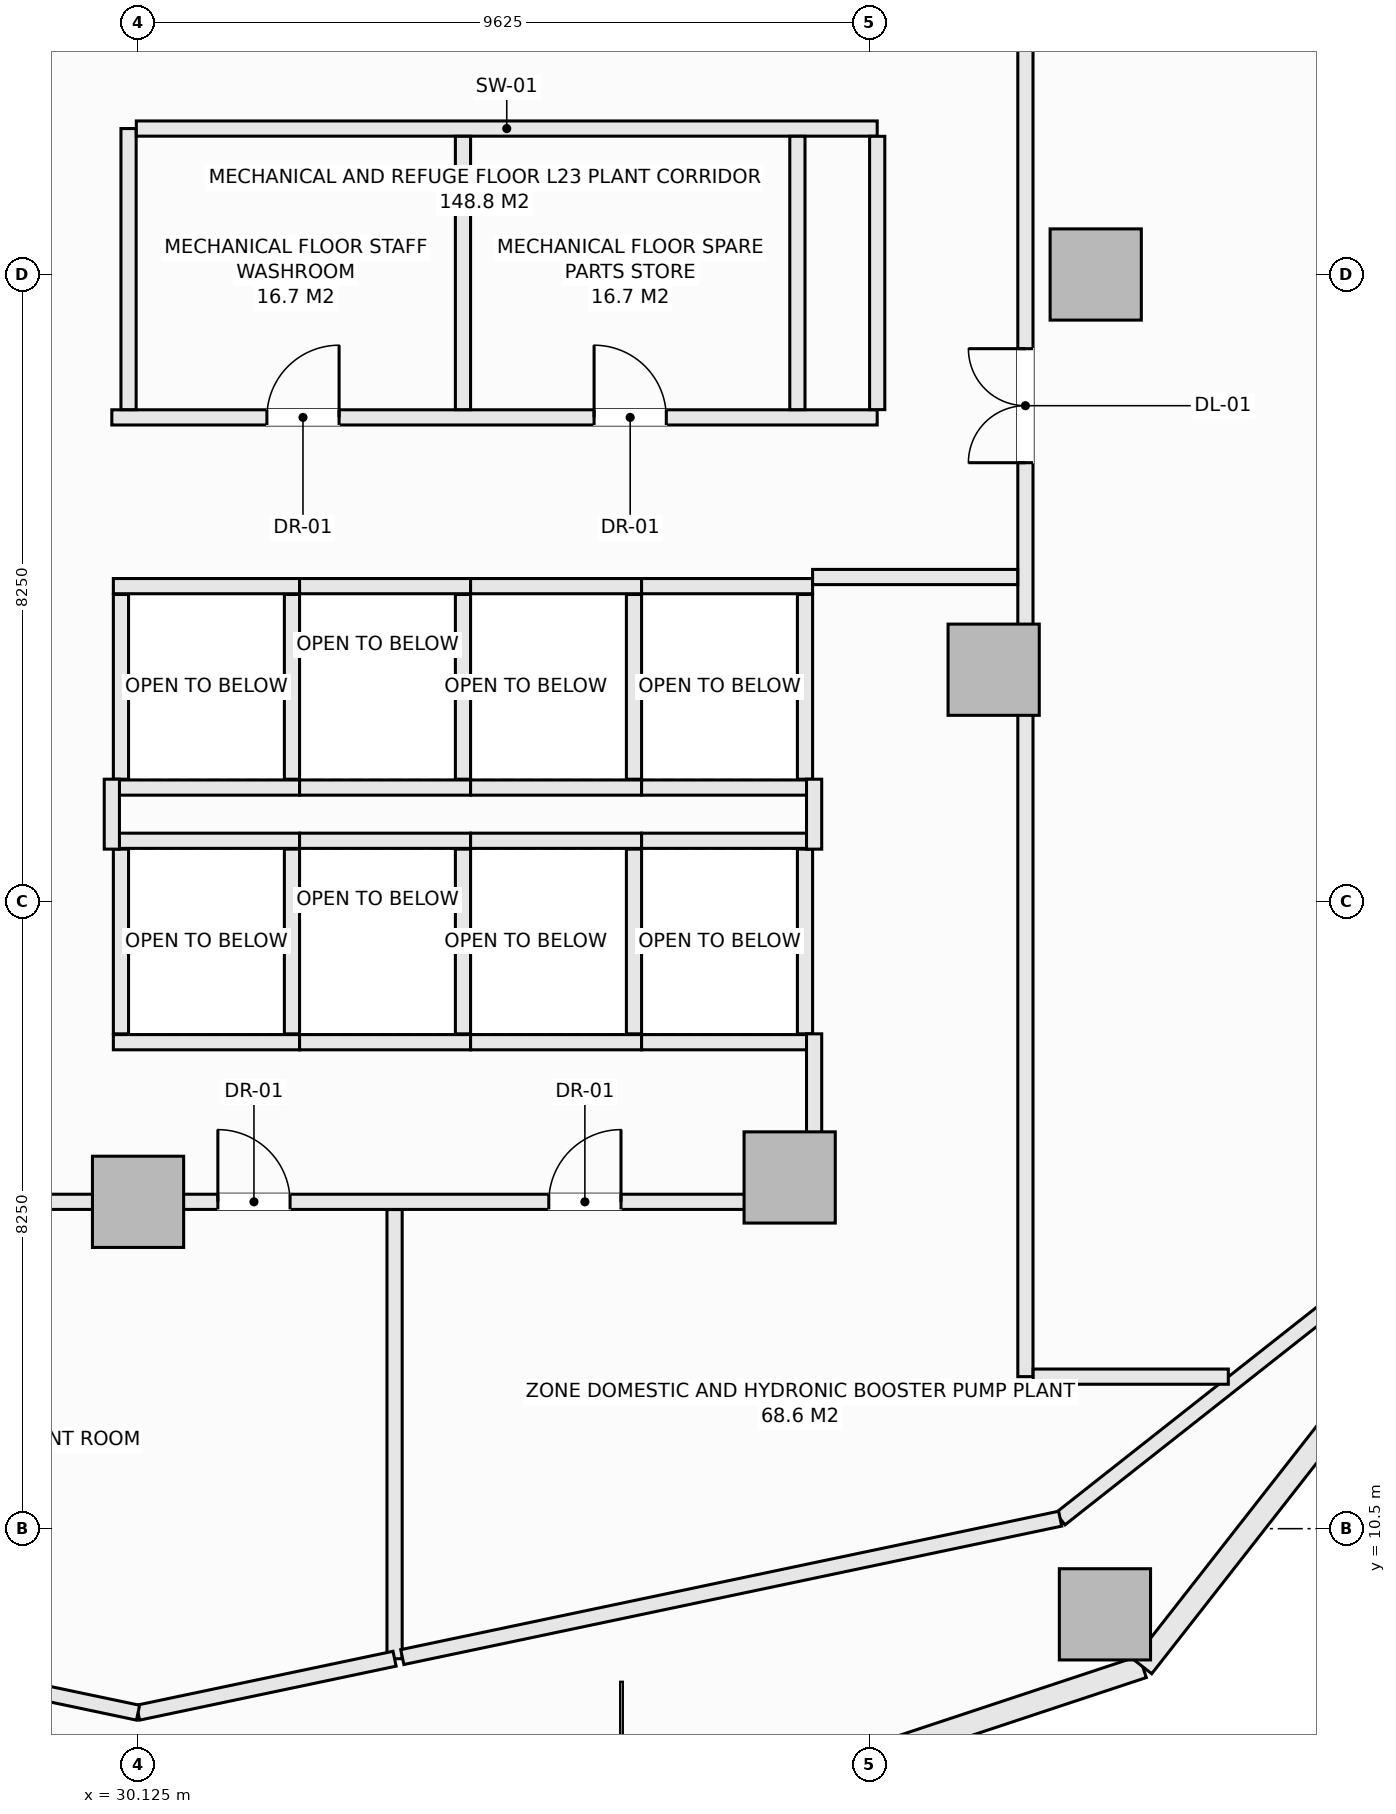
"""IFC4 building model, lengths in metres.
Left out: names, types, materials, properties, quantities, classifications, styles, units other than length and angle.
Written with IfcOpenShell. Run it as: python <this file> out.ifc"""

import sys

from ifc_helpers import new_model, si_unit, direction, frame, frame_2d, origin, origin_2d, place, context, subcontext, project, spatial, rectangle, extrude, element, fill, save


model = new_model("IFC4")
c1 = context("Model", 3, precision=1e-05, world=origin(), true_north=direction((0.0, 1.0)))
c2 = subcontext(c1, "Body", "Model", "MODEL_VIEW")
j1 = project(units=[si_unit("LENGTHUNIT", "METRE"), si_unit("PLANEANGLEUNIT", "RADIAN")], contexts=[c1])
p1 = place(None, origin())
s1 = spatial("IfcSite", under=j1, at=p1, CompositionType="ELEMENT")
p2 = place(p1, origin())
s2 = spatial("IfcBuilding", under=s1, at=p2, CompositionType="ELEMENT")
p3 = place(p2, frame((0.0, 0.0, 95.8)))
s3 = spatial("IfcBuildingStorey", under=s2, at=p3, CompositionType="ELEMENT", Elevation=95.8)
for number, where, z_axis, x_axis in (
    (1, (42.846, 9.373, -0.32), (0.0, 0.0, 1.0), (1.0, 0.0, 0.0)),
    (2, (42.725, 27.0, -0.32), (0.0, 0.0, 1.0), (1.0, 0.0, 0.0)),
    (3, (30.125, 14.8, -0.32), (0.0, 0.0, 1.0), (1.0, 0.0, 0.0)),
    (4, (38.698, 15.121, -0.32), (0.0, 0.0, 1.0), (1.0, 0.0, 0.0)),
    (5, (41.382, 21.801, -0.32), (0.0, 0.0, 1.0), (1.0, 0.0, 0.0)),
):
    element("IfcColumn", number, at=place(p3, frame(where, z_axis=z_axis, x_axis=x_axis)), inside=s3, PredefinedType="COLUMN", context=c2, shape_type="SweptSolid", body=[
        extrude(rectangle(XDim=1.2, YDim=1.2, at=origin_2d()), origin(), (0.0, 0.0, 1.0), 5.04),
    ])
p4 = place(p3, frame((36.968, 6.571, 0.0), z_axis=(0.0, 0.0, 1.0), x_axis=(0.949245153629, 0.314537181127, 0.0)))
e6 = element("IfcWall", 6, at=p4, inside=s3, PredefinedType="SOLIDWALL", context=c2, shape_type="SweptSolid", body=[
    extrude(rectangle(XDim=6.717, YDim=0.3, at=frame_2d((3.358, 0.0))), origin(), (0.0, 0.0, 1.0), 1.15),
])
p5 = place(p3, frame((43.344, 8.684, 0.0), z_axis=(0.0, 0.0, 1.0), x_axis=(0.616434798832, 0.78740595552, 0.0)))
e7 = element("IfcWall", 7, at=p5, inside=s3, PredefinedType="SOLIDWALL", context=c2, shape_type="SweptSolid", body=[
    extrude(rectangle(XDim=6.294, YDim=0.3, at=frame_2d((3.147, 0.0))), origin(), (0.0, 0.0, 1.0), 1.15),
])
for number, where, z_axis, x_axis in (
    (8, (29.8, 19.55, 0.0), (0.0, 0.0, 1.0), (1.0, 0.0, 0.0)),
    (9, (29.8, 16.9, 0.0), (0.0, 0.0, 1.0), (1.0, 0.0, 0.0)),
):
    element("IfcWall", number, at=place(p3, frame(where, z_axis=z_axis, x_axis=x_axis)), inside=s3, PredefinedType="SOLIDWALL", context=c2, shape_type="SweptSolid", body=[
        extrude(rectangle(XDim=2.45, YDim=0.2, at=frame_2d((1.225, 0.0))), origin(), (0.0, 0.0, 1.0), 4.72),
    ])
for number, where, z_axis, x_axis in (
    (10, (29.9, 17.01, 0.0), (0.0, 0.0, 1.0), (0.0, 1.0, 0.0)),
    (11, (32.15, 17.01, 0.0), (0.0, 0.0, 1.0), (0.0, 1.0, 0.0)),
):
    element("IfcWall", number, at=place(p3, frame(where, z_axis=z_axis, x_axis=x_axis)), inside=s3, PredefinedType="SOLIDWALL", context=c2, shape_type="SweptSolid", body=[
        extrude(rectangle(XDim=2.43, YDim=0.2, at=frame_2d((1.215, 0.0))), origin(), (0.0, 0.0, 1.0), 4.72),
    ])
for number, where, z_axis, x_axis in (
    (12, (32.25, 19.55, 0.0), (0.0, 0.0, 1.0), (1.0, 0.0, 0.0)),
    (13, (32.25, 16.9, 0.0), (0.0, 0.0, 1.0), (1.0, 0.0, 0.0)),
):
    element("IfcWall", number, at=place(p3, frame(where, z_axis=z_axis, x_axis=x_axis)), inside=s3, PredefinedType="SOLIDWALL", context=c2, shape_type="SweptSolid", body=[
        extrude(rectangle(XDim=2.25, YDim=0.2, at=frame_2d((1.125, 0.0))), origin(), (0.0, 0.0, 1.0), 4.72),
    ])
p6 = place(p3, frame((34.4, 17.01, 0.0), z_axis=(0.0, 0.0, 1.0), x_axis=(0.0, 1.0, 0.0)))
e14 = element("IfcWall", 14, at=p6, inside=s3, PredefinedType="SOLIDWALL", context=c2, shape_type="SweptSolid", body=[
    extrude(rectangle(XDim=2.43, YDim=0.2, at=frame_2d((1.215, 0.0))), origin(), (0.0, 0.0, 1.0), 4.72),
])
for number, where, z_axis, x_axis in (
    (15, (34.5, 19.55, 0.0), (0.0, 0.0, 1.0), (1.0, 0.0, 0.0)),
    (16, (34.5, 16.9, 0.0), (0.0, 0.0, 1.0), (1.0, 0.0, 0.0)),
):
    element("IfcWall", number, at=place(p3, frame(where, z_axis=z_axis, x_axis=x_axis)), inside=s3, PredefinedType="SOLIDWALL", context=c2, shape_type="SweptSolid", body=[
        extrude(rectangle(XDim=2.25, YDim=0.2, at=frame_2d((1.125, 0.0))), origin(), (0.0, 0.0, 1.0), 4.72),
    ])
p7 = place(p3, frame((36.65, 17.01, 0.0), z_axis=(0.0, 0.0, 1.0), x_axis=(0.0, 1.0, 0.0)))
e17 = element("IfcWall", 17, at=p7, inside=s3, PredefinedType="SOLIDWALL", context=c2, shape_type="SweptSolid", body=[
    extrude(rectangle(XDim=2.43, YDim=0.2, at=frame_2d((1.215, 0.0))), origin(), (0.0, 0.0, 1.0), 4.72),
])
for number, where, z_axis, x_axis in (
    (18, (36.75, 19.55, 0.0), (0.0, 0.0, 1.0), (1.0, 0.0, 0.0)),
    (19, (36.75, 16.9, 0.0), (0.0, 0.0, 1.0), (1.0, 0.0, 0.0)),
):
    element("IfcWall", number, at=place(p3, frame(where, z_axis=z_axis, x_axis=x_axis)), inside=s3, PredefinedType="SOLIDWALL", context=c2, shape_type="SweptSolid", body=[
        extrude(rectangle(XDim=2.25, YDim=0.2, at=frame_2d((1.125, 0.0))), origin(), (0.0, 0.0, 1.0), 4.72),
    ])
p8 = place(p3, frame((38.9, 17.01, 0.0), z_axis=(0.0, 0.0, 1.0), x_axis=(0.0, 1.0, 0.0)))
e20 = element("IfcWall", 20, at=p8, inside=s3, PredefinedType="SOLIDWALL", context=c2, shape_type="SweptSolid", body=[
    extrude(rectangle(XDim=2.43, YDim=0.2, at=frame_2d((1.215, 0.0))), origin(), (0.0, 0.0, 1.0), 4.72),
])
for number, where, z_axis, x_axis in (
    (21, (29.8, 22.9, 0.0), (0.0, 0.0, 1.0), (1.0, 0.0, 0.0)),
    (22, (29.8, 20.25, 0.0), (0.0, 0.0, 1.0), (1.0, 0.0, 0.0)),
):
    element("IfcWall", number, at=place(p3, frame(where, z_axis=z_axis, x_axis=x_axis)), inside=s3, PredefinedType="SOLIDWALL", context=c2, shape_type="SweptSolid", body=[
        extrude(rectangle(XDim=2.45, YDim=0.2, at=frame_2d((1.225, 0.0))), origin(), (0.0, 0.0, 1.0), 4.72),
    ])
for number, where, z_axis, x_axis in (
    (23, (29.9, 20.36, 0.0), (0.0, 0.0, 1.0), (0.0, 1.0, 0.0)),
    (24, (32.15, 20.36, 0.0), (0.0, 0.0, 1.0), (0.0, 1.0, 0.0)),
):
    element("IfcWall", number, at=place(p3, frame(where, z_axis=z_axis, x_axis=x_axis)), inside=s3, PredefinedType="SOLIDWALL", context=c2, shape_type="SweptSolid", body=[
        extrude(rectangle(XDim=2.43, YDim=0.2, at=frame_2d((1.215, 0.0))), origin(), (0.0, 0.0, 1.0), 4.72),
    ])
for number, where, z_axis, x_axis in (
    (25, (32.25, 22.9, 0.0), (0.0, 0.0, 1.0), (1.0, 0.0, 0.0)),
    (26, (32.25, 20.25, 0.0), (0.0, 0.0, 1.0), (1.0, 0.0, 0.0)),
):
    element("IfcWall", number, at=place(p3, frame(where, z_axis=z_axis, x_axis=x_axis)), inside=s3, PredefinedType="SOLIDWALL", context=c2, shape_type="SweptSolid", body=[
        extrude(rectangle(XDim=2.25, YDim=0.2, at=frame_2d((1.125, 0.0))), origin(), (0.0, 0.0, 1.0), 4.72),
    ])
p9 = place(p3, frame((34.4, 20.36, 0.0), z_axis=(0.0, 0.0, 1.0), x_axis=(0.0, 1.0, 0.0)))
e27 = element("IfcWall", 27, at=p9, inside=s3, PredefinedType="SOLIDWALL", context=c2, shape_type="SweptSolid", body=[
    extrude(rectangle(XDim=2.43, YDim=0.2, at=frame_2d((1.215, 0.0))), origin(), (0.0, 0.0, 1.0), 4.72),
])
for number, where, z_axis, x_axis in (
    (28, (34.5, 22.9, 0.0), (0.0, 0.0, 1.0), (1.0, 0.0, 0.0)),
    (29, (34.5, 20.25, 0.0), (0.0, 0.0, 1.0), (1.0, 0.0, 0.0)),
):
    element("IfcWall", number, at=place(p3, frame(where, z_axis=z_axis, x_axis=x_axis)), inside=s3, PredefinedType="SOLIDWALL", context=c2, shape_type="SweptSolid", body=[
        extrude(rectangle(XDim=2.25, YDim=0.2, at=frame_2d((1.125, 0.0))), origin(), (0.0, 0.0, 1.0), 4.72),
    ])
p10 = place(p3, frame((36.65, 20.36, 0.0), z_axis=(0.0, 0.0, 1.0), x_axis=(0.0, 1.0, 0.0)))
e30 = element("IfcWall", 30, at=p10, inside=s3, PredefinedType="SOLIDWALL", context=c2, shape_type="SweptSolid", body=[
    extrude(rectangle(XDim=2.43, YDim=0.2, at=frame_2d((1.215, 0.0))), origin(), (0.0, 0.0, 1.0), 4.72),
])
for number, where, z_axis, x_axis in (
    (31, (36.75, 22.9, 0.0), (0.0, 0.0, 1.0), (1.0, 0.0, 0.0)),
    (32, (36.75, 20.25, 0.0), (0.0, 0.0, 1.0), (1.0, 0.0, 0.0)),
):
    element("IfcWall", number, at=place(p3, frame(where, z_axis=z_axis, x_axis=x_axis)), inside=s3, PredefinedType="SOLIDWALL", context=c2, shape_type="SweptSolid", body=[
        extrude(rectangle(XDim=2.25, YDim=0.2, at=frame_2d((1.125, 0.0))), origin(), (0.0, 0.0, 1.0), 4.72),
    ])
p11 = place(p3, frame((38.9, 20.36, 0.0), z_axis=(0.0, 0.0, 1.0), x_axis=(0.0, 1.0, 0.0)))
e33 = element("IfcWall", 33, at=p11, inside=s3, PredefinedType="SOLIDWALL", context=c2, shape_type="SweptSolid", body=[
    extrude(rectangle(XDim=2.43, YDim=0.2, at=frame_2d((1.215, 0.0))), origin(), (0.0, 0.0, 1.0), 4.72),
])
p12 = place(p3, frame((29.78, 25.12, 0.0), z_axis=(0.0, 0.0, 1.0), x_axis=(1.0, 0.0, 0.0)))
e34 = element("IfcWall", 34, at=p12, inside=s3, PredefinedType="SOLIDWALL", context=c2, shape_type="SweptSolid", body=[
    extrude(rectangle(XDim=10.07, YDim=0.2, at=frame_2d((5.035, 0.0))), origin(), (0.0, 0.0, 1.0), 4.72),
])
p13 = place(p12, frame((2.04, 0.0, 0.0)))
e35 = element("IfcOpeningElement", 35, at=p13, cuts=e34, PredefinedType="OPENING", context=c2, shape_type="SweptSolid", body=[
    extrude(rectangle(XDim=0.95, YDim=2.1, at=frame_2d((0.475, 1.05))), frame((0.0, 0.11, 0.0), z_axis=(0.0, -1.0, 0.0), x_axis=(1.0, 0.0, 0.0)), (0.0, 0.0, 1.0), 0.22),
])
p14 = place(p12, frame((6.345, 0.0, 0.0)))
e36 = element("IfcOpeningElement", 36, at=p14, cuts=e34, PredefinedType="OPENING", context=c2, shape_type="SweptSolid", body=[
    extrude(rectangle(XDim=0.95, YDim=2.1, at=frame_2d((0.475, 1.05))), frame((0.0, 0.11, 0.0), z_axis=(0.0, -1.0, 0.0), x_axis=(1.0, 0.0, 0.0)), (0.0, 0.0, 1.0), 0.22),
])
p15 = place(p3, frame((30.0, 25.222, 0.0), z_axis=(0.0, 0.0, 1.0), x_axis=(0.0, 1.0, 0.0)))
e37 = element("IfcWall", 37, at=p15, inside=s3, PredefinedType="SOLIDWALL", context=c2, shape_type="SweptSolid", body=[
    extrude(rectangle(XDim=3.698, YDim=0.2, at=frame_2d((1.849, 0.0))), origin(), (0.0, 0.0, 1.0), 4.72),
])
p16 = place(p3, frame((30.102, 28.92, 0.0), z_axis=(0.0, 0.0, 1.0), x_axis=(1.0, 0.0, 0.0)))
e38 = element("IfcWall", 38, at=p16, inside=s3, PredefinedType="SOLIDWALL", context=c2, shape_type="SweptSolid", body=[
    extrude(rectangle(XDim=9.748, YDim=0.2, at=frame_2d((4.874, 0.0))), origin(), (0.0, 0.0, 1.0), 4.72),
])
for number, where, z_axis, x_axis in (
    (39, (34.4, 25.222, 0.0), (0.0, 0.0, 1.0), (0.0, 1.0, 0.0)),
    (40, (38.8, 25.222, 0.0), (0.0, 0.0, 1.0), (0.0, 1.0, 0.0)),
):
    element("IfcWall", number, at=place(p3, frame(where, z_axis=z_axis, x_axis=x_axis)), inside=s3, PredefinedType="SOLIDWALL", context=c2, shape_type="SweptSolid", body=[
        extrude(rectangle(XDim=3.596, YDim=0.2, at=frame_2d((1.798, 0.0))), origin(), (0.0, 0.0, 1.0), 4.72),
    ])
p17 = place(p3, frame((39.02, 14.8, 0.0), z_axis=(0.0, 0.0, 1.0), x_axis=(0.0, 1.0, 0.0)))
e41 = element("IfcWall", 41, at=p17, inside=s3, PredefinedType="SOLIDWALL", context=c2, shape_type="SweptSolid", body=[
    extrude(rectangle(XDim=2.21, YDim=0.2, at=frame_2d((1.105, 0.0))), origin(), (0.0, 0.0, 1.0), 3.512),
])
p18 = place(p3, frame((39.02, 19.44, 0.0), z_axis=(0.0, 0.0, 1.0), x_axis=(0.0, 1.0, 0.0)))
e42 = element("IfcWall", 42, at=p18, inside=s3, PredefinedType="SOLIDWALL", context=c2, shape_type="SweptSolid", body=[
    extrude(rectangle(XDim=0.92, YDim=0.2, at=frame_2d((0.46, 0.0))), origin(), (0.0, 0.0, 1.0), 4.72),
])
p19 = place(p3, frame((27.15, 14.8, 0.0), z_axis=(0.0, 0.0, 1.0), x_axis=(1.0, 0.0, 0.0)))
e43 = element("IfcWall", 43, at=p19, inside=s3, PredefinedType="SOLIDWALL", context=c2, shape_type="SweptSolid", body=[
    extrude(rectangle(XDim=11.768, YDim=0.2, at=frame_2d((5.884, 0.0))), origin(), (0.0, 0.0, 1.0), 4.084),
])
p20 = place(p19, frame((4.025, 0.0, 0.0)))
e44 = element("IfcOpeningElement", 44, at=p20, cuts=e43, PredefinedType="OPENING", context=c2, shape_type="SweptSolid", body=[
    extrude(rectangle(XDim=0.95, YDim=2.1, at=frame_2d((0.475, 1.05))), frame((0.0, 0.11, 0.0), z_axis=(0.0, -1.0, 0.0), x_axis=(1.0, 0.0, 0.0)), (0.0, 0.0, 1.0), 0.22),
])
p21 = place(p19, frame((8.379, 0.0, 0.0)))
e45 = element("IfcOpeningElement", 45, at=p21, cuts=e43, PredefinedType="OPENING", context=c2, shape_type="SweptSolid", body=[
    extrude(rectangle(XDim=0.95, YDim=2.1, at=frame_2d((0.475, 1.05))), frame((0.0, 0.11, 0.0), z_axis=(0.0, -1.0, 0.0), x_axis=(1.0, 0.0, 0.0)), (0.0, 0.0, 1.0), 0.22),
])
p22 = place(p3, frame((29.78, 19.44, 0.0), z_axis=(0.0, 0.0, 1.0), x_axis=(0.0, 1.0, 0.0)))
e46 = element("IfcWall", 46, at=p22, inside=s3, PredefinedType="SOLIDWALL", context=c2, shape_type="SweptSolid", body=[
    extrude(rectangle(XDim=0.92, YDim=0.2, at=frame_2d((0.46, 0.0))), origin(), (0.0, 0.0, 1.0), 4.72),
])
p23 = place(p3, frame((41.8, 12.5, 0.0), z_axis=(0.0, 0.0, 1.0), x_axis=(0.0, 1.0, 0.0)))
e47 = element("IfcWall", 47, at=p23, inside=s3, PredefinedType="SOLIDWALL", context=c2, shape_type="SweptSolid", body=[
    extrude(rectangle(XDim=18.518, YDim=0.2, at=frame_2d((9.259, 0.0))), origin(), (0.0, 0.0, 1.0), 4.084),
])
p24 = place(p23, frame((12.024, 0.0, 0.0)))
e48 = element("IfcOpeningElement", 48, at=p24, cuts=e47, PredefinedType="OPENING", context=c2, shape_type="SweptSolid", body=[
    extrude(rectangle(XDim=1.5, YDim=2.2, at=frame_2d((0.75, 1.1))), frame((0.0, 0.11, 0.0), z_axis=(0.0, -1.0, 0.0), x_axis=(1.0, 0.0, 0.0)), (0.0, 0.0, 1.0), 0.22),
])
p25 = place(p3, frame((39.0, 23.02, 0.0), z_axis=(0.0, 0.0, 1.0), x_axis=(1.0, 0.0, 0.0)))
e49 = element("IfcWall", 49, at=p25, inside=s3, PredefinedType="SOLIDWALL", context=c2, shape_type="SweptSolid", body=[
    extrude(rectangle(XDim=2.698, YDim=0.2, at=frame_2d((1.349, 0.0))), origin(), (0.0, 0.0, 1.0), 4.72),
])
p26 = place(p3, frame((39.85, 25.222, 0.0), z_axis=(0.0, 0.0, 1.0), x_axis=(0.0, 1.0, 0.0)))
e50 = element("IfcWall", 50, at=p26, inside=s3, PredefinedType="SOLIDWALL", context=c2, shape_type="SweptSolid", body=[
    extrude(rectangle(XDim=3.596, YDim=0.2, at=frame_2d((1.798, 0.0))), origin(), (0.0, 0.0, 1.0), 4.72),
])
p27 = place(p3, frame((42.259, 10.629, 0.0), z_axis=(0.0, 0.0, 1.0), x_axis=(0.78547601337, 0.618892100791, 0.0)))
e51 = element("IfcWall", 51, at=p27, inside=s3, PredefinedType="SOLIDWALL", context=c2, shape_type="SweptSolid", body=[
    extrude(rectangle(XDim=11.254, YDim=0.2, at=frame_2d((5.627, 0.0))), origin(), (0.0, 0.0, 1.0), 4.72),
])
p28 = place(p3, frame((41.902, 12.5, 0.0), z_axis=(0.0, 0.0, 1.0), x_axis=(1.0, 0.0, 0.0)))
e52 = element("IfcWall", 52, at=p28, inside=s3, PredefinedType="SOLIDWALL", context=c2, shape_type="SweptSolid", body=[
    extrude(rectangle(XDim=2.567, YDim=0.2, at=frame_2d((1.284, 0.0))), origin(), (0.0, 0.0, 1.0), 4.72),
])
p29 = place(p3, frame((33.5, 8.789, 0.0), z_axis=(0.0, 0.0, 1.0), x_axis=(0.0, 1.0, 0.0)))
e53 = element("IfcWall", 53, at=p29, inside=s3, PredefinedType="SOLIDWALL", context=c2, shape_type="SweptSolid", body=[
    extrude(rectangle(XDim=5.909, YDim=0.2, at=frame_2d((2.955, 0.0))), origin(), (0.0, 0.0, 1.0), 4.72),
])
p30 = place(p3, frame((30.125, 8.079, 0.0), z_axis=(0.0, 0.0, 1.0), x_axis=(0.978582819635, 0.205853504015, 0.0)))
e54 = element("IfcWall", 54, at=p30, inside=s3, PredefinedType="SOLIDWALL", context=c2, shape_type="SweptSolid", body=[
    extrude(rectangle(XDim=3.449, YDim=0.2, at=frame_2d((1.725, 0.0))), origin(), (0.0, 0.0, 1.0), 4.72),
])
p31 = place(p3, frame((33.602, 8.81, 0.0), z_axis=(0.0, 0.0, 1.0), x_axis=(0.978580818076, 0.205863018764, 0.0)))
e55 = element("IfcWall", 55, at=p31, inside=s3, PredefinedType="SOLIDWALL", context=c2, shape_type="SweptSolid", body=[
    extrude(rectangle(XDim=8.845, YDim=0.2, at=frame_2d((4.422, 0.0))), origin(), (0.0, 0.0, 1.0), 4.72),
])
p32 = place(p3, frame((19.595, 10.292, 0.0), z_axis=(0.0, 0.0, 1.0), x_axis=(0.978624828586, -0.205653701342, 0.0)))
e56 = element("IfcWall", 56, at=p32, inside=s3, PredefinedType="SOLIDWALL", context=c2, shape_type="SweptSolid", body=[
    extrude(rectangle(XDim=10.76, YDim=0.2, at=frame_2d((5.38, 0.0))), origin(), (0.0, 0.0, 1.0), 4.72),
])
p33 = place(p13, origin())
e57 = element("IfcDoor", 57, at=p33, inside=s3, OperationType="SINGLE_SWING_RIGHT", PredefinedType="DOOR", context=c2, shape_type="SweptSolid", body=[
    extrude(rectangle(XDim=0.95, YDim=2.1, at=frame_2d((0.475, 1.05))), frame((0.0, 0.025, 0.0), z_axis=(0.0, -1.0, 0.0), x_axis=(1.0, 0.0, 0.0)), (0.0, 0.0, 1.0), 0.05),
])
fill(e35, e57)
p34 = place(p14, origin())
e58 = element("IfcDoor", 58, at=p34, inside=s3, OperationType="SINGLE_SWING_LEFT", PredefinedType="DOOR", context=c2, shape_type="SweptSolid", body=[
    extrude(rectangle(XDim=0.95, YDim=2.1, at=frame_2d((0.475, 1.05))), frame((0.0, 0.025, 0.0), z_axis=(0.0, -1.0, 0.0), x_axis=(1.0, 0.0, 0.0)), (0.0, 0.0, 1.0), 0.05),
])
fill(e36, e58)
p35 = place(p24, origin())
e59 = element("IfcDoor", 59, at=p35, inside=s3, OperationType="DOUBLE_DOOR_SINGLE_SWING", PredefinedType="DOOR", context=c2, shape_type="SweptSolid", body=[
    extrude(rectangle(XDim=1.5, YDim=2.2, at=frame_2d((0.75, 1.1))), frame((0.0, 0.025, 0.0), z_axis=(0.0, -1.0, 0.0), x_axis=(1.0, 0.0, 0.0)), (0.0, 0.0, 1.0), 0.05),
])
fill(e48, e59)
p36 = place(p20, origin())
e60 = element("IfcDoor", 60, at=p36, inside=s3, OperationType="SINGLE_SWING_LEFT", PredefinedType="DOOR", context=c2, shape_type="SweptSolid", body=[
    extrude(rectangle(XDim=0.95, YDim=2.1, at=frame_2d((0.475, 1.05))), frame((0.0, 0.025, 0.0), z_axis=(0.0, -1.0, 0.0), x_axis=(1.0, 0.0, 0.0)), (0.0, 0.0, 1.0), 0.05),
])
fill(e44, e60)
p37 = place(p21, origin())
e61 = element("IfcDoor", 61, at=p37, inside=s3, OperationType="SINGLE_SWING_RIGHT", PredefinedType="DOOR", context=c2, shape_type="SweptSolid", body=[
    extrude(rectangle(XDim=0.95, YDim=2.1, at=frame_2d((0.475, 1.05))), frame((0.0, 0.025, 0.0), z_axis=(0.0, -1.0, 0.0), x_axis=(1.0, 0.0, 0.0)), (0.0, 0.0, 1.0), 0.05),
])
fill(e45, e61)
save(model, sys.argv[1])
